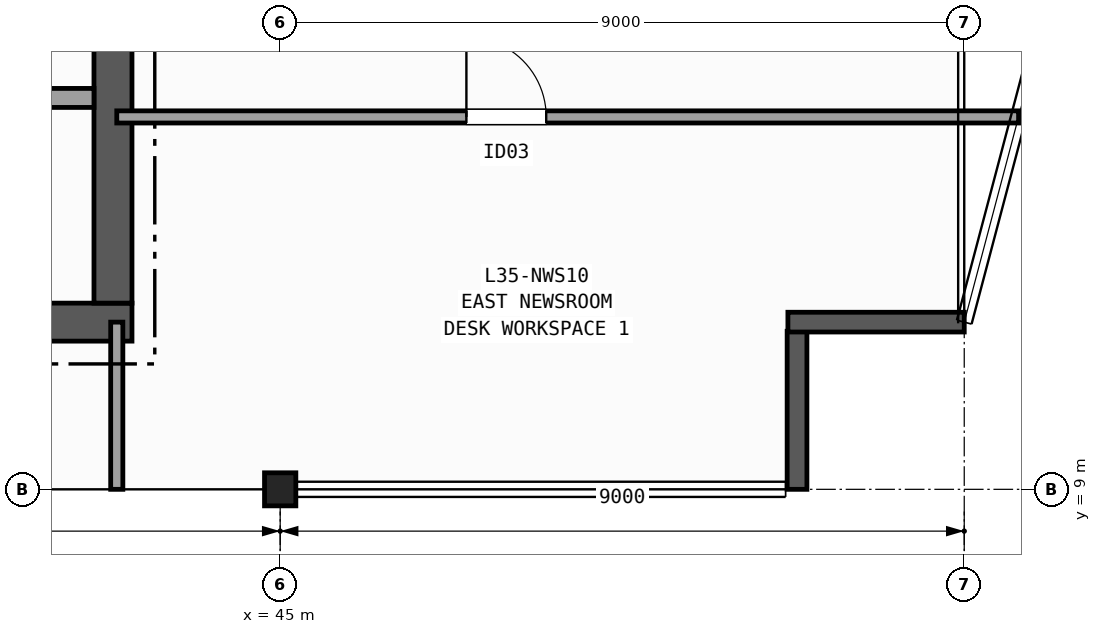
"""IFC4 building model, lengths in metres.
Left out: names, types, materials, properties, quantities, classifications, styles, units other than length and angle.
Written with IfcOpenShell. Run it as: python <this file> out.ifc"""

import sys

from ifc_helpers import new_model, si_unit, direction, frame, frame_2d, origin, origin_2d, place, context, subcontext, project, spatial, rectangle, i_section, extrude, element, fill, save


model = new_model("IFC4")
c1 = context("Model", 3, precision=1e-05, world=origin(), true_north=direction((0.0, 1.0)))
c2 = subcontext(c1, "Body", "Model", "MODEL_VIEW")
j1 = project(units=[si_unit("LENGTHUNIT", "METRE"), si_unit("PLANEANGLEUNIT", "RADIAN")], contexts=[c1])
p1 = place(None, origin())
s1 = spatial("IfcSite", under=j1, at=p1, CompositionType="ELEMENT")
p2 = place(p1, origin())
s2 = spatial("IfcBuilding", under=s1, at=p2, CompositionType="ELEMENT")
p3 = place(p2, frame((0.0, 0.0, 143.3)))
s3 = spatial("IfcBuildingStorey", under=s2, at=p3, CompositionType="ELEMENT", Elevation=143.3)
p4 = place(p3, frame((45.0, 9.0, 0.0), z_axis=(0.0, 0.0, 1.0), x_axis=(1.0, 0.0, 0.0)))
e1 = element("IfcColumn", 1, at=p4, inside=s3, PredefinedType="COLUMN", context=c2, shape_type="SweptSolid", body=[
    extrude(i_section(OverallWidth=0.412, OverallDepth=0.435, WebThickness=0.036, FlangeThickness=0.057, FilletRadius=0.015, at=origin_2d()), origin(), (0.0, 0.0, 1.0), 3.7),
])
p5 = place(p3, frame((51.8, 9.0, 0.0), z_axis=(0.0, 0.0, 1.0), x_axis=(0.0, 1.0, 0.0)))
e2 = element("IfcWall", 2, at=p5, inside=s3, PredefinedType="SOLIDWALL", context=c2, shape_type="SweptSolid", body=[
    extrude(rectangle(XDim=2.08, YDim=0.26, at=frame_2d((1.04, 0.0))), origin(), (0.0, 0.0, 1.0), 3.42),
])
p6 = place(p3, frame((51.68, 11.2, 0.0), z_axis=(0.0, 0.0, 1.0), x_axis=(1.0, 0.0, 0.0)))
e3 = element("IfcWall", 3, at=p6, inside=s3, PredefinedType="SOLIDWALL", context=c2, shape_type="SweptSolid", body=[
    extrude(rectangle(XDim=2.32, YDim=0.26, at=frame_2d((1.16, 0.0))), origin(), (0.0, 0.0, 1.0), 3.42),
])
p7 = place(p3, frame((29.15, 11.2, 0.0), z_axis=(0.0, 0.0, 1.0), x_axis=(1.0, 0.0, 0.0)))
e4 = element("IfcWall", 4, at=p7, inside=s3, PredefinedType="SHEAR", context=c2, shape_type="SweptSolid", body=[
    extrude(rectangle(XDim=13.9, YDim=0.5, at=frame_2d((6.95, 0.0))), origin(), (0.0, 0.0, 1.0), 3.42),
])
p8 = place(p3, frame((42.8, 11.45, 0.0), z_axis=(0.0, 0.0, 1.0), x_axis=(0.0, 1.0, 0.0)))
e5 = element("IfcWall", 5, at=p8, inside=s3, PredefinedType="SHEAR", context=c2, shape_type="SweptSolid", body=[
    extrude(rectangle(XDim=12.9, YDim=0.5, at=frame_2d((6.45, 0.0))), origin(), (0.0, 0.0, 1.0), 3.42),
])
p9 = place(p3, frame((38.2, 14.15, 0.0), z_axis=(0.0, 0.0, 1.0), x_axis=(1.0, 0.0, 0.0)))
e6 = element("IfcWall", 6, at=p9, inside=s3, PredefinedType="PARTITIONING", context=c2, shape_type="SweptSolid", body=[
    extrude(rectangle(XDim=4.35, YDim=0.25, at=frame_2d((2.175, 0.0))), origin(), (0.0, 0.0, 1.0), 3.42),
])
p10 = place(p9, frame((0.925, 0.0, 0.0)))
e7 = element("IfcOpeningElement", 7, at=p10, cuts=e6, PredefinedType="OPENING", context=c2, shape_type="SweptSolid", body=[
    extrude(rectangle(XDim=1.15, YDim=2.15, at=frame_2d((0.575, 1.075))), frame((0.0, 0.135, 0.0), z_axis=(0.0, -1.0, 0.0), x_axis=(1.0, 0.0, 0.0)), (0.0, 0.0, 1.0), 0.27),
])
p11 = place(p3, frame((42.85, 9.0, 0.0), z_axis=(0.0, 0.0, 1.0), x_axis=(0.0, 1.0, 0.0)))
e8 = element("IfcWall", 8, at=p11, inside=s3, PredefinedType="PARTITIONING", context=c2, shape_type="SweptSolid", body=[
    extrude(rectangle(XDim=2.2, YDim=0.16, at=frame_2d((1.1, 0.0))), origin(), (0.0, 0.0, 1.0), 2.634),
])
p12 = place(p3, frame((42.85, 13.9, 0.0), z_axis=(0.0, 0.0, 1.0), x_axis=(1.0, 0.0, 0.0)))
e9 = element("IfcWall", 9, at=p12, inside=s3, PredefinedType="PARTITIONING", context=c2, shape_type="SweptSolid", body=[
    extrude(rectangle(XDim=11.865, YDim=0.16, at=frame_2d((5.933, 0.0))), origin(), (0.0, 0.0, 1.0), 3.42),
])
p13 = place(p12, frame((4.6, 0.0, 0.0)))
e10 = element("IfcOpeningElement", 10, at=p13, cuts=e9, PredefinedType="OPENING", context=c2, shape_type="SweptSolid", body=[
    extrude(rectangle(XDim=1.05, YDim=2.15, at=frame_2d((0.525, 1.075))), frame((0.0, 0.09, 0.0), z_axis=(0.0, -1.0, 0.0), x_axis=(1.0, 0.0, 0.0)), (0.0, 0.0, 1.0), 0.18),
])
p14 = place(p13, origin())
e11 = element("IfcDoor", 11, at=p14, inside=s3, OperationType="SINGLE_SWING_LEFT", PredefinedType="DOOR", context=c2, shape_type="SweptSolid", body=[
    extrude(rectangle(XDim=1.05, YDim=2.15, at=frame_2d((0.525, 1.075))), frame((0.0, 0.025, 0.0), z_axis=(0.0, -1.0, 0.0), x_axis=(1.0, 0.0, 0.0)), (0.0, 0.0, 1.0), 0.05),
])
fill(e10, e11)
save(model, sys.argv[1])
